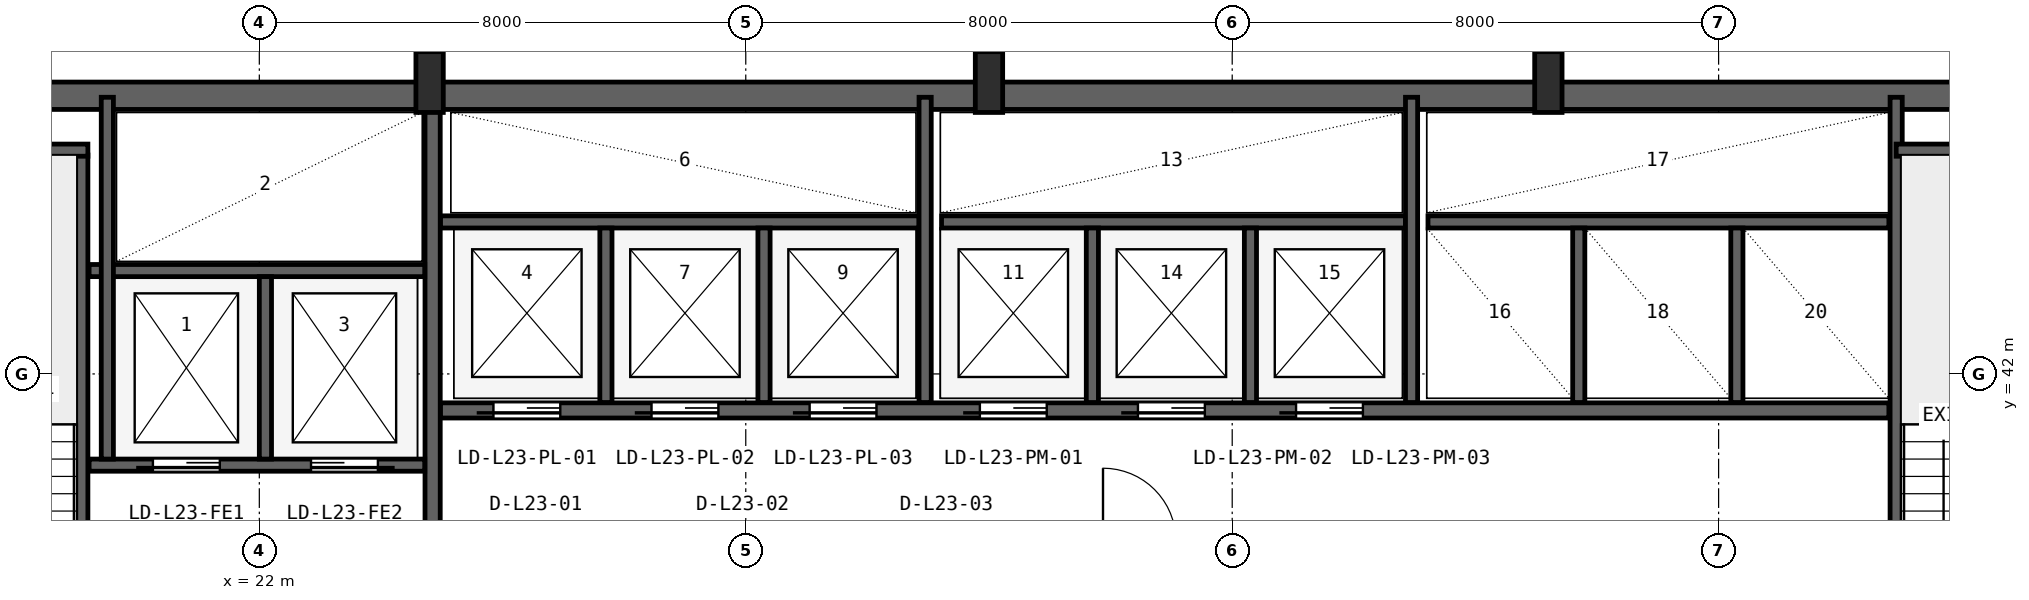
"""IFC4 building model, lengths in metres.
Left out: names, types, materials, properties, quantities, classifications, styles, units other than length and angle.
Written with IfcOpenShell. Run it as: python <this file> out.ifc"""

import sys

from ifc_helpers import new_model, si_unit, direction, frame, frame_2d, origin, origin_2d, place, context, subcontext, project, spatial, rectangle, i_section, extrude, source, transform, mapped, element, fill, save


model = new_model("IFC4")
c1 = context("Model", 3, precision=1e-05, world=origin(), true_north=direction((0.0, 1.0)))
c2 = subcontext(c1, "Body", "Model", "MODEL_VIEW")
j1 = project(units=[si_unit("LENGTHUNIT", "METRE"), si_unit("PLANEANGLEUNIT", "RADIAN")], contexts=[c1])
p1 = place(None, origin())
s1 = spatial("IfcSite", under=j1, at=p1, CompositionType="ELEMENT")
p2 = place(p1, origin())
s2 = spatial("IfcBuilding", under=s1, at=p2, CompositionType="ELEMENT")
p3 = place(p2, frame((0.0, 0.0, 98.4)))
s3 = spatial("IfcBuildingStorey", under=s2, at=p3, CompositionType="ELEMENT", Elevation=98.4)
p4 = place(p3, frame((15.6, 46.575, 0.0), z_axis=(0.0, 0.0, 1.0), x_axis=(1.0, 0.0, 0.0)))
e1 = element("IfcWall", 1, at=p4, inside=s3, PredefinedType="SHEAR", context=c2, shape_type="SweptSolid", body=[
    extrude(rectangle(XDim=36.8, YDim=0.45, at=frame_2d((18.4, 0.0))), origin(), (0.0, 0.0, 1.0), 4.35),
])
m1 = source(origin(), c2, "Body", "SweptSolid", [
    extrude(i_section(OverallWidth=0.45, OverallDepth=1.0, WebThickness=0.016, FlangeThickness=0.03, FilletRadius=0.016, at=origin_2d()), origin(), (0.0, 0.0, 1.0), 4.6),
])
for number, where, z_axis, x_axis in (
    (2, (24.8, 46.8, 0.0), (0.0, 0.0, 1.0), (1.0, 0.0, 0.0)),
    (3, (34.0, 46.8, 0.0), (0.0, 0.0, 1.0), (1.0, 0.0, 0.0)),
    (4, (43.2, 46.8, 0.0), (0.0, 0.0, 1.0), (1.0, 0.0, 0.0)),
):
    element("IfcColumn", number, at=place(p3, frame(where, z_axis=z_axis, x_axis=x_axis)), inside=s3, PredefinedType="COLUMN", context=c2, shape_type="MappedRepresentation", body=[
        mapped(m1, transform((0.0, 0.0, 0.0), x_axis=(1.0, 0.0, 0.0), y_axis=(0.0, 1.0, 0.0), z_axis=(0.0, 0.0, 1.0), scale=1.0)),
    ])
p5 = place(p3, frame((19.08, 35.95, 0.0), z_axis=(0.0, 0.0, 1.0), x_axis=(0.0, 1.0, 0.0)))
e5 = element("IfcWall", 5, at=p5, inside=s3, PredefinedType="SHEAR", context=c2, shape_type="SweptSolid", body=[
    extrude(rectangle(XDim=9.65, YDim=0.2, at=frame_2d((4.825, 0.0))), origin(), (0.0, 0.0, 1.0), 4.35),
])
p6 = place(p5, frame((0.25, 0.0, 0.0)))
e6 = element("IfcOpeningElement", 6, at=p6, cuts=e5, PredefinedType="OPENING", context=c2, shape_type="SweptSolid", body=[
    extrude(rectangle(XDim=0.95, YDim=2.1, at=frame_2d((0.475, 1.05))), frame((0.0, 0.11, 0.0), z_axis=(0.0, -1.0, 0.0), x_axis=(1.0, 0.0, 0.0)), (0.0, 0.0, 1.0), 0.22),
])
p7 = place(p3, frame((15.95, 45.68, 0.0), z_axis=(0.0, 0.0, 1.0), x_axis=(1.0, 0.0, 0.0)))
e7 = element("IfcWall", 7, at=p7, inside=s3, PredefinedType="SHEAR", context=c2, shape_type="SweptSolid", body=[
    extrude(rectangle(XDim=3.23, YDim=0.2, at=frame_2d((1.615, 0.0))), origin(), (0.0, 0.0, 1.0), 4.35),
])
p8 = place(p3, frame((24.85, 36.05, 0.0), z_axis=(0.0, 0.0, 1.0), x_axis=(0.0, 1.0, 0.0)))
e8 = element("IfcWall", 8, at=p8, inside=s3, PredefinedType="SHEAR", context=c2, shape_type="SweptSolid", body=[
    extrude(rectangle(XDim=10.45, YDim=0.25, at=frame_2d((5.225, 0.0))), origin(), (0.0, 0.0, 1.0), 4.35),
])
p9 = place(p3, frame((19.2, 40.5, 0.0), z_axis=(0.0, 0.0, 1.0), x_axis=(1.0, 0.0, 0.0)))
e9 = element("IfcWall", 9, at=p9, inside=s3, PredefinedType="SHEAR", context=c2, shape_type="SweptSolid", body=[
    extrude(rectangle(XDim=5.52, YDim=0.2, at=frame_2d((2.76, 0.0))), origin(), (0.0, 0.0, 1.0), 4.35),
])
p10 = place(p9, frame((1.05, 0.0, 0.0)))
e10 = element("IfcOpeningElement", 10, at=p10, cuts=e9, PredefinedType="OPENING", context=c2, shape_type="SweptSolid", body=[
    extrude(rectangle(XDim=1.1, YDim=2.18, at=frame_2d((0.55, 1.09))), frame((0.0, 0.11, 0.0), z_axis=(0.0, -1.0, 0.0), x_axis=(1.0, 0.0, 0.0)), (0.0, 0.0, 1.0), 0.22),
])
p11 = place(p9, frame((3.65, 0.0, 0.0)))
e11 = element("IfcOpeningElement", 11, at=p11, cuts=e9, PredefinedType="OPENING", context=c2, shape_type="SweptSolid", body=[
    extrude(rectangle(XDim=1.1, YDim=2.18, at=frame_2d((0.55, 1.09))), frame((0.0, 0.11, 0.0), z_axis=(0.0, -1.0, 0.0), x_axis=(1.0, 0.0, 0.0)), (0.0, 0.0, 1.0), 0.22),
])
p12 = place(p3, frame((19.2, 43.7, 0.0), z_axis=(0.0, 0.0, 1.0), x_axis=(1.0, 0.0, 0.0)))
e12 = element("IfcWall", 12, at=p12, inside=s3, PredefinedType="SHEAR", context=c2, shape_type="SweptSolid", body=[
    extrude(rectangle(XDim=5.52, YDim=0.2, at=frame_2d((2.76, 0.0))), origin(), (0.0, 0.0, 1.0), 4.35),
])
p13 = place(p3, frame((22.1, 40.6, 0.0), z_axis=(0.0, 0.0, 1.0), x_axis=(0.0, 1.0, 0.0)))
e13 = element("IfcWall", 13, at=p13, inside=s3, PredefinedType="SHEAR", context=c2, shape_type="SweptSolid", body=[
    extrude(rectangle(XDim=3.0, YDim=0.2, at=frame_2d((1.5, 0.0))), origin(), (0.0, 0.0, 1.0), 4.35),
])
p14 = place(p3, frame((19.5, 40.6, 0.0), z_axis=(0.0, 0.0, 1.0), x_axis=(0.0, 1.0, 0.0)))
e14 = element("IfcWall", 14, at=p14, inside=s3, PredefinedType="SHEAR", context=c2, shape_type="SweptSolid", body=[
    extrude(rectangle(XDim=5.95, YDim=0.2, at=frame_2d((2.975, 0.0))), origin(), (0.0, 0.0, 1.0), 4.35),
])
p15 = place(p3, frame((48.92, 36.05, 0.0), z_axis=(0.0, 0.0, 1.0), x_axis=(0.0, 1.0, 0.0)))
e15 = element("IfcWall", 15, at=p15, inside=s3, PredefinedType="SHEAR", context=c2, shape_type="SweptSolid", body=[
    extrude(rectangle(XDim=10.5, YDim=0.2, at=frame_2d((5.25, 0.0))), origin(), (0.0, 0.0, 1.0), 4.35),
])
p16 = place(p3, frame((48.92, 45.68, 0.0), z_axis=(0.0, 0.0, 1.0), x_axis=(1.0, 0.0, 0.0)))
e16 = element("IfcWall", 16, at=p16, inside=s3, PredefinedType="SHEAR", context=c2, shape_type="SweptSolid", body=[
    extrude(rectangle(XDim=3.18, YDim=0.2, at=frame_2d((1.59, 0.0))), origin(), (0.0, 0.0, 1.0), 4.35),
])
p17 = place(p3, frame((24.98, 41.4, 0.0), z_axis=(0.0, 0.0, 1.0), x_axis=(1.0, 0.0, 0.0)))
e17 = element("IfcWall", 17, at=p17, inside=s3, PredefinedType="SHEAR", context=c2, shape_type="SweptSolid", body=[
    extrude(rectangle(XDim=23.82, YDim=0.25, at=frame_2d((11.91, 0.0))), origin(), (0.0, 0.0, 1.0), 4.35),
])
p18 = place(p17, frame((0.87, 0.0, 0.0)))
e18 = element("IfcOpeningElement", 18, at=p18, cuts=e17, PredefinedType="OPENING", context=c2, shape_type="SweptSolid", body=[
    extrude(rectangle(XDim=1.1, YDim=2.18, at=frame_2d((0.55, 1.09))), frame((0.0, 0.135, 0.0), z_axis=(0.0, -1.0, 0.0), x_axis=(1.0, 0.0, 0.0)), (0.0, 0.0, 1.0), 0.27),
])
p19 = place(p17, frame((3.47, 0.0, 0.0)))
e19 = element("IfcOpeningElement", 19, at=p19, cuts=e17, PredefinedType="OPENING", context=c2, shape_type="SweptSolid", body=[
    extrude(rectangle(XDim=1.1, YDim=2.18, at=frame_2d((0.55, 1.09))), frame((0.0, 0.135, 0.0), z_axis=(0.0, -1.0, 0.0), x_axis=(1.0, 0.0, 0.0)), (0.0, 0.0, 1.0), 0.27),
])
p20 = place(p17, frame((6.07, 0.0, 0.0)))
e20 = element("IfcOpeningElement", 20, at=p20, cuts=e17, PredefinedType="OPENING", context=c2, shape_type="SweptSolid", body=[
    extrude(rectangle(XDim=1.1, YDim=2.18, at=frame_2d((0.55, 1.09))), frame((0.0, 0.135, 0.0), z_axis=(0.0, -1.0, 0.0), x_axis=(1.0, 0.0, 0.0)), (0.0, 0.0, 1.0), 0.27),
])
p21 = place(p17, frame((8.87, 0.0, 0.0)))
e21 = element("IfcOpeningElement", 21, at=p21, cuts=e17, PredefinedType="OPENING", context=c2, shape_type="SweptSolid", body=[
    extrude(rectangle(XDim=1.1, YDim=2.18, at=frame_2d((0.55, 1.09))), frame((0.0, 0.135, 0.0), z_axis=(0.0, -1.0, 0.0), x_axis=(1.0, 0.0, 0.0)), (0.0, 0.0, 1.0), 0.27),
])
p22 = place(p17, frame((11.47, 0.0, 0.0)))
e22 = element("IfcOpeningElement", 22, at=p22, cuts=e17, PredefinedType="OPENING", context=c2, shape_type="SweptSolid", body=[
    extrude(rectangle(XDim=1.1, YDim=2.18, at=frame_2d((0.55, 1.09))), frame((0.0, 0.135, 0.0), z_axis=(0.0, -1.0, 0.0), x_axis=(1.0, 0.0, 0.0)), (0.0, 0.0, 1.0), 0.27),
])
p23 = place(p17, frame((14.07, 0.0, 0.0)))
e23 = element("IfcOpeningElement", 23, at=p23, cuts=e17, PredefinedType="OPENING", context=c2, shape_type="SweptSolid", body=[
    extrude(rectangle(XDim=1.1, YDim=2.18, at=frame_2d((0.55, 1.09))), frame((0.0, 0.135, 0.0), z_axis=(0.0, -1.0, 0.0), x_axis=(1.0, 0.0, 0.0)), (0.0, 0.0, 1.0), 0.27),
])
p24 = place(p3, frame((24.98, 44.5, 0.0), z_axis=(0.0, 0.0, 1.0), x_axis=(1.0, 0.0, 0.0)))
e24 = element("IfcWall", 24, at=p24, inside=s3, PredefinedType="SHEAR", context=c2, shape_type="SweptSolid", body=[
    extrude(rectangle(XDim=7.87, YDim=0.2, at=frame_2d((3.935, 0.0))), origin(), (0.0, 0.0, 1.0), 4.35),
])
for number, where, z_axis, x_axis in (
    (25, (27.7, 41.53, 0.0), (0.0, 0.0, 1.0), (0.0, 1.0, 0.0)),
    (26, (30.3, 41.53, 0.0), (0.0, 0.0, 1.0), (0.0, 1.0, 0.0)),
):
    element("IfcWall", number, at=place(p3, frame(where, z_axis=z_axis, x_axis=x_axis)), inside=s3, PredefinedType="SHEAR", context=c2, shape_type="SweptSolid", body=[
        extrude(rectangle(XDim=2.87, YDim=0.2, at=frame_2d((1.435, 0.0))), origin(), (0.0, 0.0, 1.0), 4.35),
    ])
p25 = place(p3, frame((32.95, 41.53, 0.0), z_axis=(0.0, 0.0, 1.0), x_axis=(0.0, 1.0, 0.0)))
e27 = element("IfcWall", 27, at=p25, inside=s3, PredefinedType="SHEAR", context=c2, shape_type="SweptSolid", body=[
    extrude(rectangle(XDim=5.02, YDim=0.2, at=frame_2d((2.51, 0.0))), origin(), (0.0, 0.0, 1.0), 4.35),
])
p26 = place(p3, frame((33.22, 44.5, 0.0), z_axis=(0.0, 0.0, 1.0), x_axis=(1.0, 0.0, 0.0)))
e28 = element("IfcWall", 28, at=p26, inside=s3, PredefinedType="SHEAR", context=c2, shape_type="SweptSolid", body=[
    extrude(rectangle(XDim=7.63, YDim=0.2, at=frame_2d((3.815, 0.0))), origin(), (0.0, 0.0, 1.0), 4.35),
])
for number, where, z_axis, x_axis in (
    (29, (35.7, 41.53, 0.0), (0.0, 0.0, 1.0), (0.0, 1.0, 0.0)),
    (30, (38.3, 41.53, 0.0), (0.0, 0.0, 1.0), (0.0, 1.0, 0.0)),
):
    element("IfcWall", number, at=place(p3, frame(where, z_axis=z_axis, x_axis=x_axis)), inside=s3, PredefinedType="SHEAR", context=c2, shape_type="SweptSolid", body=[
        extrude(rectangle(XDim=2.87, YDim=0.2, at=frame_2d((1.435, 0.0))), origin(), (0.0, 0.0, 1.0), 4.35),
    ])
p27 = place(p3, frame((40.95, 41.53, 0.0), z_axis=(0.0, 0.0, 1.0), x_axis=(0.0, 1.0, 0.0)))
e31 = element("IfcWall", 31, at=p27, inside=s3, PredefinedType="SHEAR", context=c2, shape_type="SweptSolid", body=[
    extrude(rectangle(XDim=5.02, YDim=0.2, at=frame_2d((2.51, 0.0))), origin(), (0.0, 0.0, 1.0), 4.35),
])
p28 = place(p3, frame((41.22, 44.5, 0.0), z_axis=(0.0, 0.0, 1.0), x_axis=(1.0, 0.0, 0.0)))
e32 = element("IfcWall", 32, at=p28, inside=s3, PredefinedType="SHEAR", context=c2, shape_type="SweptSolid", body=[
    extrude(rectangle(XDim=7.58, YDim=0.2, at=frame_2d((3.79, 0.0))), origin(), (0.0, 0.0, 1.0), 4.35),
])
for number, where, z_axis, x_axis in (
    (33, (43.7, 41.53, 0.0), (0.0, 0.0, 1.0), (0.0, 1.0, 0.0)),
    (34, (46.3, 41.53, 0.0), (0.0, 0.0, 1.0), (0.0, 1.0, 0.0)),
):
    element("IfcWall", number, at=place(p3, frame(where, z_axis=z_axis, x_axis=x_axis)), inside=s3, PredefinedType="SHEAR", context=c2, shape_type="SweptSolid", body=[
        extrude(rectangle(XDim=2.87, YDim=0.2, at=frame_2d((1.435, 0.0))), origin(), (0.0, 0.0, 1.0), 4.35),
    ])
m2 = source(origin(), c2, "Body", "SweptSolid", [
    extrude(rectangle(XDim=1.1, YDim=2.18, at=frame_2d((0.55, 1.09))), frame((0.0, 0.025, 0.0), z_axis=(0.0, -1.0, 0.0), x_axis=(1.0, 0.0, 0.0)), (0.0, 0.0, 1.0), 0.05),
])
p29 = place(p10, frame((1.1, 0.0, 0.0), z_axis=(0.0, 0.0, 1.0), x_axis=(-1.0, 0.0, 0.0)))
e35 = element("IfcDoor", 35, at=p29, inside=s3, OperationType="SLIDING_TO_LEFT", PredefinedType="DOOR", context=c2, shape_type="MappedRepresentation", body=[
    mapped(m2, transform((0.0, 0.0, 0.0), x_axis=(1.0, 0.0, 0.0), y_axis=(0.0, 1.0, 0.0), z_axis=(0.0, 0.0, 1.0), scale=1.0)),
])
fill(e10, e35)
p30 = place(p11, frame((1.1, 0.0, 0.0), z_axis=(0.0, 0.0, 1.0), x_axis=(-1.0, 0.0, 0.0)))
e36 = element("IfcDoor", 36, at=p30, inside=s3, OperationType="SLIDING_TO_RIGHT", PredefinedType="DOOR", context=c2, shape_type="MappedRepresentation", body=[
    mapped(m2, transform((0.0, 0.0, 0.0), x_axis=(1.0, 0.0, 0.0), y_axis=(0.0, 1.0, 0.0), z_axis=(0.0, 0.0, 1.0), scale=1.0)),
])
fill(e11, e36)
p31 = place(p18, frame((1.1, 0.0, 0.0), z_axis=(0.0, 0.0, 1.0), x_axis=(-1.0, 0.0, 0.0)))
e37 = element("IfcDoor", 37, at=p31, inside=s3, OperationType="SLIDING_TO_LEFT", PredefinedType="DOOR", context=c2, shape_type="MappedRepresentation", body=[
    mapped(m2, transform((0.0, 0.0, 0.0), x_axis=(1.0, 0.0, 0.0), y_axis=(0.0, 1.0, 0.0), z_axis=(0.0, 0.0, 1.0), scale=1.0)),
])
fill(e18, e37)
p32 = place(p19, frame((1.1, 0.0, 0.0), z_axis=(0.0, 0.0, 1.0), x_axis=(-1.0, 0.0, 0.0)))
e38 = element("IfcDoor", 38, at=p32, inside=s3, OperationType="SLIDING_TO_LEFT", PredefinedType="DOOR", context=c2, shape_type="MappedRepresentation", body=[
    mapped(m2, transform((0.0, 0.0, 0.0), x_axis=(1.0, 0.0, 0.0), y_axis=(0.0, 1.0, 0.0), z_axis=(0.0, 0.0, 1.0), scale=1.0)),
])
fill(e19, e38)
p33 = place(p20, frame((1.1, 0.0, 0.0), z_axis=(0.0, 0.0, 1.0), x_axis=(-1.0, 0.0, 0.0)))
e39 = element("IfcDoor", 39, at=p33, inside=s3, OperationType="SLIDING_TO_LEFT", PredefinedType="DOOR", context=c2, shape_type="MappedRepresentation", body=[
    mapped(m2, transform((0.0, 0.0, 0.0), x_axis=(1.0, 0.0, 0.0), y_axis=(0.0, 1.0, 0.0), z_axis=(0.0, 0.0, 1.0), scale=1.0)),
])
fill(e20, e39)
p34 = place(p21, frame((1.1, 0.0, 0.0), z_axis=(0.0, 0.0, 1.0), x_axis=(-1.0, 0.0, 0.0)))
e40 = element("IfcDoor", 40, at=p34, inside=s3, OperationType="SLIDING_TO_LEFT", PredefinedType="DOOR", context=c2, shape_type="MappedRepresentation", body=[
    mapped(m2, transform((0.0, 0.0, 0.0), x_axis=(1.0, 0.0, 0.0), y_axis=(0.0, 1.0, 0.0), z_axis=(0.0, 0.0, 1.0), scale=1.0)),
])
fill(e21, e40)
p35 = place(p22, frame((1.1, 0.0, 0.0), z_axis=(0.0, 0.0, 1.0), x_axis=(-1.0, 0.0, 0.0)))
e41 = element("IfcDoor", 41, at=p35, inside=s3, OperationType="SLIDING_TO_LEFT", PredefinedType="DOOR", context=c2, shape_type="MappedRepresentation", body=[
    mapped(m2, transform((0.0, 0.0, 0.0), x_axis=(1.0, 0.0, 0.0), y_axis=(0.0, 1.0, 0.0), z_axis=(0.0, 0.0, 1.0), scale=1.0)),
])
fill(e22, e41)
p36 = place(p23, frame((1.1, 0.0, 0.0), z_axis=(0.0, 0.0, 1.0), x_axis=(-1.0, 0.0, 0.0)))
e42 = element("IfcDoor", 42, at=p36, inside=s3, OperationType="SLIDING_TO_LEFT", PredefinedType="DOOR", context=c2, shape_type="MappedRepresentation", body=[
    mapped(m2, transform((0.0, 0.0, 0.0), x_axis=(1.0, 0.0, 0.0), y_axis=(0.0, 1.0, 0.0), z_axis=(0.0, 0.0, 1.0), scale=1.0)),
])
fill(e23, e42)
save(model, sys.argv[1])
